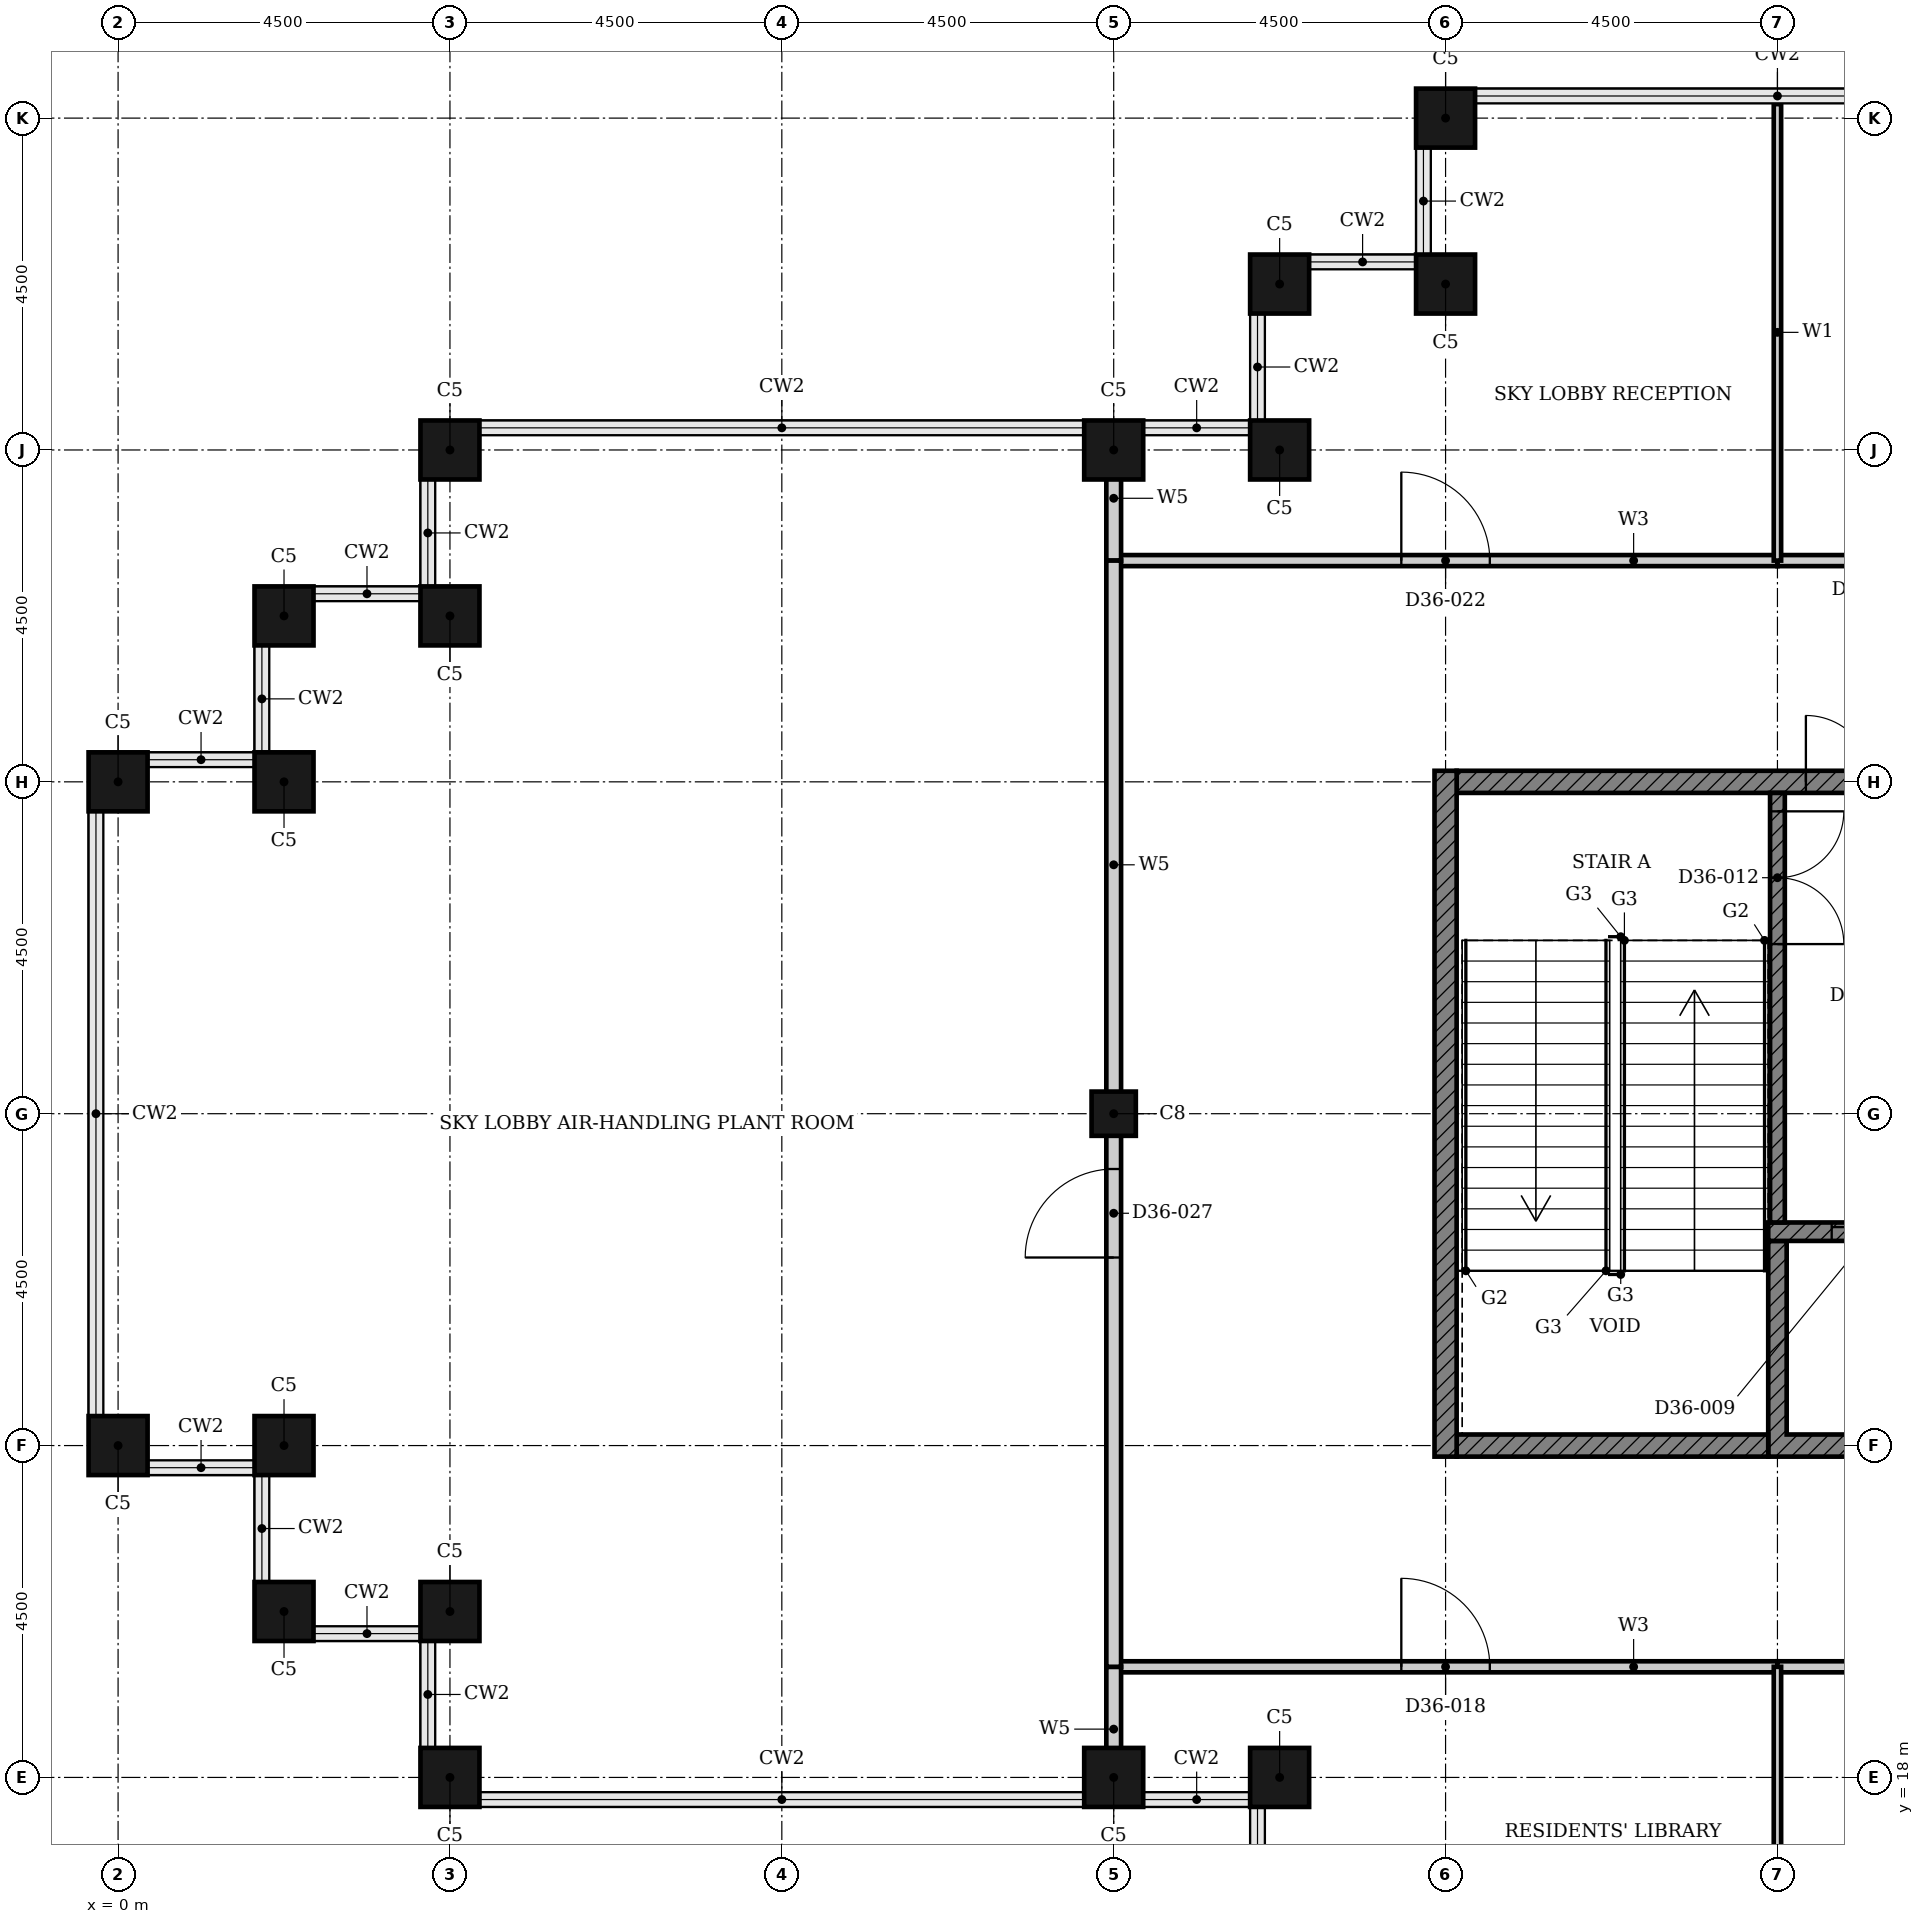
"""IFC4 building model, lengths in metres.
Left out: names, types, materials, properties, quantities, classifications, styles, units other than length and angle.
Written with IfcOpenShell. Run it as: python <this file> out.ifc"""

import sys

from ifc_helpers import new_model, si_unit, direction, frame, frame_2d, origin, origin_2d, place, context, subcontext, project, spatial, polyline, rectangle, hollow_rectangle, outline, extrude, element, fill, save


model = new_model("IFC4")
c1 = context("Model", 3, precision=1e-05, world=origin(), true_north=direction((0.0, 1.0)))
c2 = subcontext(c1, "Body", "Model", "MODEL_VIEW")
j1 = project(units=[si_unit("LENGTHUNIT", "METRE"), si_unit("PLANEANGLEUNIT", "RADIAN")], contexts=[c1])
p1 = place(None, origin())
s1 = spatial("IfcSite", under=j1, at=p1, CompositionType="ELEMENT")
p2 = place(p1, origin())
s2 = spatial("IfcBuilding", under=s1, at=p2, CompositionType="ELEMENT")
p3 = place(p2, frame((0.0, 0.0, 145.2)))
s3 = spatial("IfcBuildingStorey", under=s2, at=p3, CompositionType="ELEMENT", Elevation=145.2)
for number, where, z_axis, x_axis in (
    (1, (18.0, 40.5, 0.0), (0.0, 0.0, 1.0), (1.0, 0.0, 0.0)),
    (2, (18.0, 38.25, 0.0), (0.0, 0.0, 1.0), (1.0, 0.0, 0.0)),
    (3, (15.75, 38.25, 0.0), (0.0, 0.0, 1.0), (1.0, 0.0, 0.0)),
    (4, (15.75, 36.0, 0.0), (0.0, 0.0, 1.0), (1.0, 0.0, 0.0)),
    (5, (13.5, 36.0, 0.0), (0.0, 0.0, 1.0), (1.0, 0.0, 0.0)),
    (6, (4.5, 36.0, 0.0), (0.0, 0.0, 1.0), (1.0, 0.0, 0.0)),
    (7, (4.5, 33.75, 0.0), (0.0, 0.0, 1.0), (1.0, 0.0, 0.0)),
    (8, (2.25, 33.75, 0.0), (0.0, 0.0, 1.0), (1.0, 0.0, 0.0)),
    (9, (2.25, 31.5, 0.0), (0.0, 0.0, 1.0), (1.0, 0.0, 0.0)),
    (10, (0.0, 31.5, 0.0), (0.0, 0.0, 1.0), (1.0, 0.0, 0.0)),
    (11, (0.0, 22.5, 0.0), (0.0, 0.0, 1.0), (1.0, 0.0, 0.0)),
    (12, (2.25, 22.5, 0.0), (0.0, 0.0, 1.0), (1.0, 0.0, 0.0)),
    (13, (2.25, 20.25, 0.0), (0.0, 0.0, 1.0), (1.0, 0.0, 0.0)),
    (14, (4.5, 20.25, 0.0), (0.0, 0.0, 1.0), (1.0, 0.0, 0.0)),
    (15, (4.5, 18.0, 0.0), (0.0, 0.0, 1.0), (1.0, 0.0, 0.0)),
    (16, (13.5, 18.0, 0.0), (0.0, 0.0, 1.0), (1.0, 0.0, 0.0)),
    (17, (15.75, 18.0, 0.0), (0.0, 0.0, 1.0), (1.0, 0.0, 0.0)),
):
    element("IfcColumn", number, at=place(p3, frame(where, z_axis=z_axis, x_axis=x_axis)), inside=s3, PredefinedType="COLUMN", context=c2, shape_type="SweptSolid", body=[
        extrude(hollow_rectangle(XDim=0.8, YDim=0.8, WallThickness=0.025, at=origin_2d()), origin(), (0.0, 0.0, 1.0), 5.4),
    ])
p4 = place(p3, frame((13.5, 27.0, 0.0), z_axis=(0.0, 0.0, 1.0), x_axis=(1.0, 0.0, 0.0)))
e18 = element("IfcColumn", 18, at=p4, inside=s3, PredefinedType="COLUMN", context=c2, shape_type="SweptSolid", body=[
    extrude(hollow_rectangle(XDim=0.6, YDim=0.6, WallThickness=0.02, at=origin_2d()), origin(), (0.0, 0.0, 1.0), 5.4),
])
p5 = place(p3, origin())
e19 = element("IfcWall", 19, at=p5, inside=s3, PredefinedType="SHEAR", context=c2, shape_type="SweptSolid", body=[
    extrude(outline(polyline([(22.375, 22.35), (38.053, 22.35), (38.053, 25.275), (37.803, 25.275), (37.803, 22.65), (35.482, 22.65), (35.482, 25.275), (35.232, 25.275), (35.232, 22.65), (32.911, 22.65), (32.911, 25.275), (32.661, 25.275), (32.661, 22.65), (30.339, 22.65), (30.339, 25.275), (30.089, 25.275), (30.089, 22.65), (27.768, 22.65), (27.768, 25.275), (27.518, 25.275), (27.518, 22.65), (25.197, 22.65), (25.197, 25.275), (24.947, 25.275), (24.947, 22.65), (22.625, 22.65), (22.625, 25.275), (22.375, 25.275), (22.375, 22.35)])), origin(), (0.0, 0.0, 1.0), 5.1),
])
p6 = place(p3, frame((18.15, 22.5, 0.0), z_axis=(0.0, 0.0, 1.0), x_axis=(1.0, 0.0, 0.0)))
e20 = element("IfcWall", 20, at=p6, inside=s3, PredefinedType="SHEAR", context=c2, shape_type="SweptSolid", body=[
    extrude(rectangle(XDim=4.225, YDim=0.3, at=frame_2d((2.113, 0.0))), origin(), (0.0, 0.0, 1.0), 5.1),
])
p7 = place(p3, frame((18.15, 31.5, 0.0), z_axis=(0.0, 0.0, 1.0), x_axis=(1.0, 0.0, 0.0)))
e21 = element("IfcWall", 21, at=p7, inside=s3, PredefinedType="SHEAR", context=c2, shape_type="SweptSolid", body=[
    extrude(rectangle(XDim=6.797, YDim=0.3, at=frame_2d((3.398, 0.0))), origin(), (0.0, 0.0, 1.0), 5.1),
])
p8 = place(p7, frame((4.736, 0.0, 0.0)))
e22 = element("IfcOpeningElement", 22, at=p8, cuts=e21, PredefinedType="OPENING", context=c2, shape_type="SweptSolid", body=[
    extrude(rectangle(XDim=1.8, YDim=2.1, at=frame_2d((0.9, 1.05))), frame((0.0, 0.16, 0.0), z_axis=(0.0, -1.0, 0.0), x_axis=(1.0, 0.0, 0.0)), (0.0, 0.0, 1.0), 0.32),
])
p9 = place(p3, frame((18.0, 22.35, 0.0), z_axis=(0.0, 0.0, 1.0), x_axis=(0.0, 1.0, 0.0)))
e23 = element("IfcWall", 23, at=p9, inside=s3, PredefinedType="SHEAR", context=c2, shape_type="SweptSolid", body=[
    extrude(rectangle(XDim=9.3, YDim=0.3, at=frame_2d((4.65, 0.0))), origin(), (0.0, 0.0, 1.0), 5.1),
])
p10 = place(p3, frame((22.375, 25.4, 0.0), z_axis=(0.0, 0.0, 1.0), x_axis=(1.0, 0.0, 0.0)))
e24 = element("IfcWall", 24, at=p10, inside=s3, PredefinedType="SHEAR", context=c2, shape_type="SweptSolid", body=[
    extrude(rectangle(XDim=15.678, YDim=0.25, at=frame_2d((7.839, 0.0))), origin(), (0.0, 0.0, 1.0), 5.1),
])
p11 = place(p10, frame((3.432, 0.0, 0.0)))
e25 = element("IfcOpeningElement", 25, at=p11, cuts=e24, PredefinedType="OPENING", context=c2, shape_type="SweptSolid", body=[
    extrude(rectangle(XDim=1.1, YDim=2.1, at=frame_2d((0.55, 1.05))), frame((0.0, 0.135, 0.0), z_axis=(0.0, -1.0, 0.0), x_axis=(1.0, 0.0, 0.0)), (0.0, 0.0, 1.0), 0.27),
])
p12 = place(p10, frame((11.146, 0.0, 0.0)))
e26 = element("IfcOpeningElement", 26, at=p12, cuts=e24, PredefinedType="OPENING", context=c2, shape_type="SweptSolid", body=[
    extrude(rectangle(XDim=1.1, YDim=2.1, at=frame_2d((0.55, 1.05))), frame((0.0, 0.135, 0.0), z_axis=(0.0, -1.0, 0.0), x_axis=(1.0, 0.0, 0.0)), (0.0, 0.0, 1.0), 0.27),
])
p13 = place(p10, frame((13.718, 0.0, 0.0)))
e27 = element("IfcOpeningElement", 27, at=p13, cuts=e24, PredefinedType="OPENING", context=c2, shape_type="SweptSolid", body=[
    extrude(rectangle(XDim=1.1, YDim=2.1, at=frame_2d((0.55, 1.05))), frame((0.0, 0.135, 0.0), z_axis=(0.0, -1.0, 0.0), x_axis=(1.0, 0.0, 0.0)), (0.0, 0.0, 1.0), 0.27),
])
p14 = place(p10, frame((8.575, 0.0, 0.0)))
e28 = element("IfcOpeningElement", 28, at=p14, cuts=e24, PredefinedType="OPENING", context=c2, shape_type="SweptSolid", body=[
    extrude(rectangle(XDim=1.1, YDim=2.1, at=frame_2d((0.55, 1.05))), frame((0.0, 0.135, 0.0), z_axis=(0.0, -1.0, 0.0), x_axis=(1.0, 0.0, 0.0)), (0.0, 0.0, 1.0), 0.27),
])
p15 = place(p10, frame((0.861, 0.0, 0.0)))
e29 = element("IfcOpeningElement", 29, at=p15, cuts=e24, PredefinedType="OPENING", context=c2, shape_type="SweptSolid", body=[
    extrude(rectangle(XDim=1.1, YDim=2.1, at=frame_2d((0.55, 1.05))), frame((0.0, 0.135, 0.0), z_axis=(0.0, -1.0, 0.0), x_axis=(1.0, 0.0, 0.0)), (0.0, 0.0, 1.0), 0.27),
])
p16 = place(p3, frame((22.5, 31.35, 0.0), z_axis=(0.0, 0.0, 1.0), x_axis=(0.0, -1.0, 0.0)))
e30 = element("IfcWall", 30, at=p16, inside=s3, PredefinedType="SHEAR", context=c2, shape_type="SweptSolid", body=[
    extrude(rectangle(XDim=5.825, YDim=0.2, at=frame_2d((2.913, 0.0))), origin(), (0.0, 0.0, 1.0), 5.1),
])
p17 = place(p16, frame((0.25, 0.0, 0.0)))
e31 = element("IfcOpeningElement", 31, at=p17, cuts=e30, PredefinedType="OPENING", context=c2, shape_type="SweptSolid", body=[
    extrude(rectangle(XDim=1.8, YDim=2.1, at=frame_2d((0.9, 1.05))), frame((0.0, 0.11, 0.0), z_axis=(0.0, -1.0, 0.0), x_axis=(1.0, 0.0, 0.0)), (0.0, 0.0, 1.0), 0.22),
])
p18 = place(p3, frame((13.5, 19.5, 0.0), z_axis=(0.0, 0.0, 1.0), x_axis=(1.0, 0.0, 0.0)))
e32 = element("IfcWall", 32, at=p18, inside=s3, PredefinedType="PARTITIONING", context=c2, shape_type="SweptSolid", body=[
    extrude(rectangle(XDim=9.0, YDim=0.15, at=frame_2d((4.5, 0.0))), origin(), (0.0, 0.0, 1.0), 5.1),
])
p19 = place(p18, frame((3.9, 0.0, 0.0)))
e33 = element("IfcOpeningElement", 33, at=p19, cuts=e32, PredefinedType="OPENING", context=c2, shape_type="SweptSolid", body=[
    extrude(rectangle(XDim=1.2, YDim=2.4, at=frame_2d((0.6, 1.2))), frame((0.0, 0.085, 0.0), z_axis=(0.0, -1.0, 0.0), x_axis=(1.0, 0.0, 0.0)), (0.0, 0.0, 1.0), 0.17),
])
p20 = place(p3, frame((22.5, 19.5, 0.0), z_axis=(0.0, 0.0, 1.0), x_axis=(1.0, 0.0, 0.0)))
e34 = element("IfcWall", 34, at=p20, inside=s3, PredefinedType="PARTITIONING", context=c2, shape_type="SweptSolid", body=[
    extrude(rectangle(XDim=4.5, YDim=0.15, at=frame_2d((2.25, 0.0))), origin(), (0.0, 0.0, 1.0), 5.1),
])
p21 = place(p3, frame((13.5, 34.5, 0.0), z_axis=(0.0, 0.0, 1.0), x_axis=(1.0, 0.0, 0.0)))
e35 = element("IfcWall", 35, at=p21, inside=s3, PredefinedType="PARTITIONING", context=c2, shape_type="SweptSolid", body=[
    extrude(rectangle(XDim=9.0, YDim=0.15, at=frame_2d((4.5, 0.0))), origin(), (0.0, 0.0, 1.0), 5.1),
])
p22 = place(p21, frame((3.9, 0.0, 0.0)))
e36 = element("IfcOpeningElement", 36, at=p22, cuts=e35, PredefinedType="OPENING", context=c2, shape_type="SweptSolid", body=[
    extrude(rectangle(XDim=1.2, YDim=2.4, at=frame_2d((0.6, 1.2))), frame((0.0, 0.085, 0.0), z_axis=(0.0, -1.0, 0.0), x_axis=(1.0, 0.0, 0.0)), (0.0, 0.0, 1.0), 0.17),
])
p23 = place(p3, frame((22.5, 34.5, 0.0), z_axis=(0.0, 0.0, 1.0), x_axis=(1.0, 0.0, 0.0)))
e37 = element("IfcWall", 37, at=p23, inside=s3, PredefinedType="PARTITIONING", context=c2, shape_type="SweptSolid", body=[
    extrude(rectangle(XDim=9.0, YDim=0.15, at=frame_2d((4.5, 0.0))), origin(), (0.0, 0.0, 1.0), 5.1),
])
p24 = place(p23, frame((3.9, 0.0, 0.0)))
e38 = element("IfcOpeningElement", 38, at=p24, cuts=e37, PredefinedType="OPENING", context=c2, shape_type="SweptSolid", body=[
    extrude(rectangle(XDim=1.2, YDim=2.4, at=frame_2d((0.6, 1.2))), frame((0.0, 0.085, 0.0), z_axis=(0.0, -1.0, 0.0), x_axis=(1.0, 0.0, 0.0)), (0.0, 0.0, 1.0), 0.17),
])
for number, where, z_axis, x_axis in (
    (39, (22.5, 13.31, 0.0), (0.0, 0.0, 1.0), (0.0, 1.0, 0.0)),
    (40, (22.5, 34.5, 0.0), (0.0, 0.0, 1.0), (0.0, 1.0, 0.0)),
):
    element("IfcWall", number, at=place(p3, frame(where, z_axis=z_axis, x_axis=x_axis)), inside=s3, PredefinedType="PARTITIONING", context=c2, shape_type="SweptSolid", body=[
        extrude(rectangle(XDim=6.19, YDim=0.1, at=frame_2d((3.095, 0.0))), origin(), (0.0, 0.0, 1.0), 5.1),
    ])
for number, where, z_axis, x_axis in (
    (41, (13.5, 17.81, 0.0), (0.0, 0.0, 1.0), (0.0, 1.0, 0.0)),
    (42, (13.5, 34.5, 0.0), (0.0, 0.0, 1.0), (0.0, 1.0, 0.0)),
):
    element("IfcWall", number, at=place(p3, frame(where, z_axis=z_axis, x_axis=x_axis)), inside=s3, PredefinedType="PARTITIONING", context=c2, shape_type="SweptSolid", body=[
        extrude(rectangle(XDim=1.69, YDim=0.2, at=frame_2d((0.845, 0.0))), origin(), (0.0, 0.0, 1.0), 4.18),
    ])
p25 = place(p3, frame((13.5, 19.5, 0.0), z_axis=(0.0, 0.0, 1.0), x_axis=(0.0, 1.0, 0.0)))
e43 = element("IfcWall", 43, at=p25, inside=s3, PredefinedType="PARTITIONING", context=c2, shape_type="SweptSolid", body=[
    extrude(rectangle(XDim=15.0, YDim=0.2, at=frame_2d((7.5, 0.0))), origin(), (0.0, 0.0, 1.0), 4.18),
])
p26 = place(p25, frame((5.55, 0.0, 0.0)))
e44 = element("IfcOpeningElement", 44, at=p26, cuts=e43, PredefinedType="OPENING", context=c2, shape_type="SweptSolid", body=[
    extrude(rectangle(XDim=1.2, YDim=2.1, at=frame_2d((0.6, 1.05))), frame((0.0, 0.11, 0.0), z_axis=(0.0, -1.0, 0.0), x_axis=(1.0, 0.0, 0.0)), (0.0, 0.0, 1.0), 0.22),
])
p27 = place(p15, origin())
e45 = element("IfcDoor", 45, at=p27, inside=s3, OperationType="DOUBLE_DOOR_SLIDING", PredefinedType="DOOR", context=c2, shape_type="SweptSolid", body=[
    extrude(rectangle(XDim=1.1, YDim=2.1, at=frame_2d((0.55, 1.05))), frame((0.0, 0.025, 0.0), z_axis=(0.0, -1.0, 0.0), x_axis=(1.0, 0.0, 0.0)), (0.0, 0.0, 1.0), 0.05),
])
fill(e29, e45)
p28 = place(p17, origin())
e46 = element("IfcDoor", 46, at=p28, inside=s3, OperationType="DOUBLE_DOOR_SINGLE_SWING", PredefinedType="DOOR", context=c2, shape_type="SweptSolid", body=[
    extrude(rectangle(XDim=1.8, YDim=2.1, at=frame_2d((0.9, 1.05))), frame((0.0, 0.025, 0.0), z_axis=(0.0, -1.0, 0.0), x_axis=(1.0, 0.0, 0.0)), (0.0, 0.0, 1.0), 0.05),
])
fill(e31, e46)
p29 = place(p8, origin())
e47 = element("IfcDoor", 47, at=p29, inside=s3, OperationType="DOUBLE_DOOR_SINGLE_SWING", PredefinedType="DOOR", context=c2, shape_type="SweptSolid", body=[
    extrude(rectangle(XDim=1.8, YDim=2.1, at=frame_2d((0.9, 1.05))), frame((0.0, 0.025, 0.0), z_axis=(0.0, -1.0, 0.0), x_axis=(1.0, 0.0, 0.0)), (0.0, 0.0, 1.0), 0.05),
])
fill(e22, e47)
p30 = place(p19, origin())
e48 = element("IfcDoor", 48, at=p30, inside=s3, OperationType="SINGLE_SWING_LEFT", PredefinedType="DOOR", context=c2, shape_type="SweptSolid", body=[
    extrude(rectangle(XDim=1.2, YDim=2.4, at=frame_2d((0.6, 1.2))), frame((0.0, 0.025, 0.0), z_axis=(0.0, -1.0, 0.0), x_axis=(1.0, 0.0, 0.0)), (0.0, 0.0, 1.0), 0.05),
])
fill(e33, e48)
p31 = place(p22, origin())
e49 = element("IfcDoor", 49, at=p31, inside=s3, OperationType="SINGLE_SWING_RIGHT", PredefinedType="DOOR", context=c2, shape_type="SweptSolid", body=[
    extrude(rectangle(XDim=1.2, YDim=2.4, at=frame_2d((0.6, 1.2))), frame((0.0, 0.025, 0.0), z_axis=(0.0, -1.0, 0.0), x_axis=(1.0, 0.0, 0.0)), (0.0, 0.0, 1.0), 0.05),
])
fill(e36, e49)
p32 = place(p26, origin())
e50 = element("IfcDoor", 50, at=p32, inside=s3, OperationType="SINGLE_SWING_LEFT", PredefinedType="DOOR", context=c2, shape_type="SweptSolid", body=[
    extrude(rectangle(XDim=1.2, YDim=2.1, at=frame_2d((0.6, 1.05))), frame((0.0, 0.025, 0.0), z_axis=(0.0, -1.0, 0.0), x_axis=(1.0, 0.0, 0.0)), (0.0, 0.0, 1.0), 0.05),
])
fill(e44, e50)
save(model, sys.argv[1])
